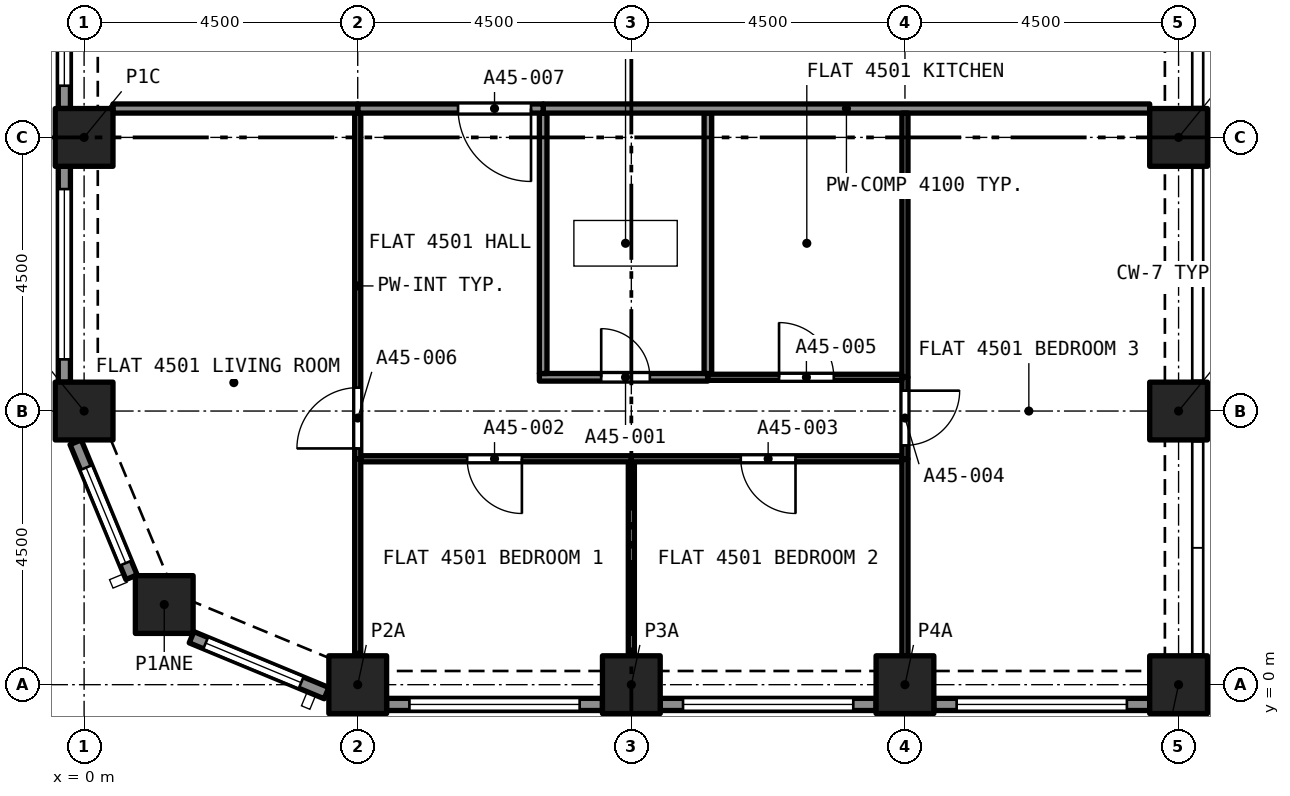
"""IFC4 building model, lengths in metres.
Left out: names, types, materials, properties, quantities, classifications, styles, units other than length and angle.
Written with IfcOpenShell. Run it as: python <this file> out.ifc"""

import sys

from ifc_helpers import new_model, si_unit, direction, frame, frame_2d, origin, origin_2d, place, context, subcontext, project, spatial, rectangle, extrude, element, fill, save


model = new_model("IFC4")
c1 = context("Model", 3, precision=1e-05, world=origin(), true_north=direction((0.0, 1.0)))
c2 = subcontext(c1, "Body", "Model", "MODEL_VIEW")
j1 = project(units=[si_unit("LENGTHUNIT", "METRE"), si_unit("PLANEANGLEUNIT", "RADIAN")], contexts=[c1])
p1 = place(None, origin())
s1 = spatial("IfcSite", under=j1, at=p1, CompositionType="ELEMENT")
p2 = place(p1, origin())
s2 = spatial("IfcBuilding", under=s1, at=p2, CompositionType="ELEMENT")
p3 = place(p2, frame((0.0, 0.0, 163.8)))
s3 = spatial("IfcBuildingStorey", under=s2, at=p3, CompositionType="ELEMENT", Elevation=163.8)
for number, where, z_axis, x_axis in (
    (1, (4.5, 0.0, 0.0), (0.0, 0.0, 1.0), (1.0, 0.0, 0.0)),
    (2, (9.0, 0.0, 0.0), (0.0, 0.0, 1.0), (1.0, 0.0, 0.0)),
    (3, (13.5, 0.0, 0.0), (0.0, 0.0, 1.0), (1.0, 0.0, 0.0)),
    (4, (18.0, 0.0, 0.0), (0.0, 0.0, 1.0), (1.0, 0.0, 0.0)),
    (5, (1.318, 1.318, 0.0), (0.0, 0.0, 1.0), (1.0, 0.0, 0.0)),
    (6, (0.0, 4.5, 0.0), (0.0, 0.0, 1.0), (1.0, 0.0, 0.0)),
    (7, (18.0, 4.5, 0.0), (0.0, 0.0, 1.0), (1.0, 0.0, 0.0)),
    (8, (0.0, 9.0, 0.0), (0.0, 0.0, 1.0), (1.0, 0.0, 0.0)),
    (9, (18.0, 9.0, 0.0), (0.0, 0.0, 1.0), (1.0, 0.0, 0.0)),
):
    element("IfcColumn", number, at=place(p3, frame(where, z_axis=z_axis, x_axis=x_axis)), inside=s3, PredefinedType="COLUMN", context=c2, shape_type="SweptSolid", body=[
        extrude(rectangle(XDim=0.95, YDim=0.95, at=origin_2d()), origin(), (0.0, 0.0, 1.0), 4.4),
    ])
p4 = place(p3, frame((-0.325, 9.475, 0.0), z_axis=(0.0, 0.0, 1.0), x_axis=(0.0, 1.0, 0.0)))
e10 = element("IfcWall", 10, at=p4, inside=s3, PredefinedType="SOLIDWALL", context=c2, shape_type="SweptSolid", body=[
    extrude(rectangle(XDim=3.55, YDim=0.2, at=frame_2d((1.775, 0.0))), origin(), (0.0, 0.0, 1.0), 4.4),
])
p5 = place(p4, frame((0.375, 0.0, 0.45)))
e11 = element("IfcOpeningElement", 11, at=p5, cuts=e10, PredefinedType="OPENING", context=c2, shape_type="SweptSolid", body=[
    extrude(rectangle(XDim=2.8, YDim=2.55, at=frame_2d((1.4, 1.275))), frame((0.0, 0.11, 0.0), z_axis=(0.0, -1.0, 0.0), x_axis=(1.0, 0.0, 0.0)), (0.0, 0.0, 1.0), 0.22),
])
p6 = place(p3, frame((-0.325, 4.975, 0.0), z_axis=(0.0, 0.0, 1.0), x_axis=(0.0, 1.0, 0.0)))
e12 = element("IfcWall", 12, at=p6, inside=s3, PredefinedType="SOLIDWALL", context=c2, shape_type="SweptSolid", body=[
    extrude(rectangle(XDim=3.55, YDim=0.2, at=frame_2d((1.775, 0.0))), origin(), (0.0, 0.0, 1.0), 4.4),
])
p7 = place(p6, frame((0.375, 0.0, 0.45)))
e13 = element("IfcOpeningElement", 13, at=p7, cuts=e12, PredefinedType="OPENING", context=c2, shape_type="SweptSolid", body=[
    extrude(rectangle(XDim=2.8, YDim=2.55, at=frame_2d((1.4, 1.275))), frame((0.0, 0.11, 0.0), z_axis=(0.0, -1.0, 0.0), x_axis=(1.0, 0.0, 0.0)), (0.0, 0.0, 1.0), 0.22),
])
p8 = place(p3, frame((0.78, 1.767, 0.0), z_axis=(0.0, 0.0, 1.0), x_axis=(-0.382680855588, 0.923880599843, 0.0)))
e14 = element("IfcWall", 14, at=p8, inside=s3, PredefinedType="SOLIDWALL", context=c2, shape_type="SweptSolid", body=[
    extrude(rectangle(XDim=2.403, YDim=0.2, at=frame_2d((1.201, 0.0))), origin(), (0.0, 0.0, 1.0), 4.4),
])
p9 = place(p8, frame((0.251, 0.0, 0.45)))
e15 = element("IfcOpeningElement", 15, at=p9, cuts=e14, PredefinedType="OPENING", context=c2, shape_type="SweptSolid", body=[
    extrude(rectangle(XDim=1.7, YDim=2.55, at=frame_2d((0.85, 1.275))), frame((0.0, 0.11, 0.0), z_axis=(0.0, -1.0, 0.0), x_axis=(1.0, 0.0, 0.0)), (0.0, 0.0, 1.0), 0.22),
])
p10 = place(p3, frame((3.987, -0.139, 0.0), z_axis=(0.0, 0.0, 1.0), x_axis=(-0.923880599843, 0.382680855588, 0.0)))
e16 = element("IfcWall", 16, at=p10, inside=s3, PredefinedType="SOLIDWALL", context=c2, shape_type="SweptSolid", body=[
    extrude(rectangle(XDim=2.403, YDim=0.2, at=frame_2d((1.201, 0.0))), origin(), (0.0, 0.0, 1.0), 4.4),
])
p11 = place(p10, frame((0.451, 0.0, 0.45)))
e17 = element("IfcOpeningElement", 17, at=p11, cuts=e16, PredefinedType="OPENING", context=c2, shape_type="SweptSolid", body=[
    extrude(rectangle(XDim=1.7, YDim=2.55, at=frame_2d((0.85, 1.275))), frame((0.0, 0.11, 0.0), z_axis=(0.0, -1.0, 0.0), x_axis=(1.0, 0.0, 0.0)), (0.0, 0.0, 1.0), 0.22),
])
p12 = place(p3, frame((8.525, -0.325, 0.0), z_axis=(0.0, 0.0, 1.0), x_axis=(-1.0, 0.0, 0.0)))
e18 = element("IfcWall", 18, at=p12, inside=s3, PredefinedType="SOLIDWALL", context=c2, shape_type="SweptSolid", body=[
    extrude(rectangle(XDim=3.55, YDim=0.2, at=frame_2d((1.775, 0.0))), origin(), (0.0, 0.0, 1.0), 4.4),
])
p13 = place(p12, frame((0.375, 0.0, 0.45)))
e19 = element("IfcOpeningElement", 19, at=p13, cuts=e18, PredefinedType="OPENING", context=c2, shape_type="SweptSolid", body=[
    extrude(rectangle(XDim=2.8, YDim=2.55, at=frame_2d((1.4, 1.275))), frame((0.0, 0.11, 0.0), z_axis=(0.0, -1.0, 0.0), x_axis=(1.0, 0.0, 0.0)), (0.0, 0.0, 1.0), 0.22),
])
p14 = place(p3, frame((13.025, -0.325, 0.0), z_axis=(0.0, 0.0, 1.0), x_axis=(-1.0, 0.0, 0.0)))
e20 = element("IfcWall", 20, at=p14, inside=s3, PredefinedType="SOLIDWALL", context=c2, shape_type="SweptSolid", body=[
    extrude(rectangle(XDim=3.55, YDim=0.2, at=frame_2d((1.775, 0.0))), origin(), (0.0, 0.0, 1.0), 4.4),
])
p15 = place(p14, frame((0.375, 0.0, 0.45)))
e21 = element("IfcOpeningElement", 21, at=p15, cuts=e20, PredefinedType="OPENING", context=c2, shape_type="SweptSolid", body=[
    extrude(rectangle(XDim=2.8, YDim=2.55, at=frame_2d((1.4, 1.275))), frame((0.0, 0.11, 0.0), z_axis=(0.0, -1.0, 0.0), x_axis=(1.0, 0.0, 0.0)), (0.0, 0.0, 1.0), 0.22),
])
p16 = place(p3, frame((17.525, -0.325, 0.0), z_axis=(0.0, 0.0, 1.0), x_axis=(-1.0, 0.0, 0.0)))
e22 = element("IfcWall", 22, at=p16, inside=s3, PredefinedType="SOLIDWALL", context=c2, shape_type="SweptSolid", body=[
    extrude(rectangle(XDim=3.55, YDim=0.2, at=frame_2d((1.775, 0.0))), origin(), (0.0, 0.0, 1.0), 4.4),
])
p17 = place(p16, frame((0.375, 0.0, 0.45)))
e23 = element("IfcOpeningElement", 23, at=p17, cuts=e22, PredefinedType="OPENING", context=c2, shape_type="SweptSolid", body=[
    extrude(rectangle(XDim=2.8, YDim=2.55, at=frame_2d((1.4, 1.275))), frame((0.0, 0.11, 0.0), z_axis=(0.0, -1.0, 0.0), x_axis=(1.0, 0.0, 0.0)), (0.0, 0.0, 1.0), 0.22),
])
p18 = place(p3, frame((7.488, 5.055, 0.0), z_axis=(0.0, 0.0, 1.0), x_axis=(1.0, 0.0, 0.0)))
e24 = element("IfcWall", 24, at=p18, inside=s3, PredefinedType="PARTITIONING", context=c2, shape_type="SweptSolid", body=[
    extrude(rectangle(XDim=2.771, YDim=0.125, at=frame_2d((1.385, 0.0))), origin(), (0.0, 0.0, 1.0), 4.1),
])
p19 = place(p18, frame((1.017, 0.0, 0.0)))
e25 = element("IfcOpeningElement", 25, at=p19, cuts=e24, PredefinedType="OPENING", context=c2, shape_type="SweptSolid", body=[
    extrude(rectangle(XDim=0.8, YDim=2.1, at=frame_2d((0.4, 1.05))), frame((0.0, 0.073, 0.0), z_axis=(0.0, -1.0, 0.0), x_axis=(1.0, 0.0, 0.0)), (0.0, 0.0, 1.0), 0.145),
])
for number, where, z_axis, x_axis in (
    (26, (7.55, 5.117, 0.0), (0.0, 0.0, 1.0), (0.0, 1.0, 0.0)),
    (27, (10.259, 5.117, 0.0), (0.0, 0.0, 1.0), (0.0, 1.0, 0.0)),
):
    element("IfcWall", number, at=place(p3, frame(where, z_axis=z_axis, x_axis=x_axis)), inside=s3, PredefinedType="PARTITIONING", context=c2, shape_type="SweptSolid", body=[
        extrude(rectangle(XDim=4.282, YDim=0.125, at=frame_2d((2.141, 0.0))), origin(), (0.0, 0.0, 1.0), 4.1),
    ])
p20 = place(p3, frame((7.55, 9.475, 0.0), z_axis=(0.0, 0.0, 1.0), x_axis=(1.0, 0.0, 0.0)))
e28 = element("IfcWall", 28, at=p20, inside=s3, PredefinedType="PARTITIONING", context=c2, shape_type="SweptSolid", body=[
    extrude(rectangle(XDim=9.975, YDim=0.15, at=frame_2d((4.987, 0.0))), origin(), (0.0, 0.0, 1.0), 4.1),
])
p21 = place(p3, frame((9.0, 0.475, 0.0), z_axis=(0.0, 0.0, 1.0), x_axis=(0.0, 1.0, 0.0)))
e29 = element("IfcWall", 29, at=p21, inside=s3, PredefinedType="PARTITIONING", context=c2, shape_type="SweptSolid", body=[
    extrude(rectangle(XDim=3.19, YDim=0.1, at=frame_2d((1.595, 0.0))), origin(), (0.0, 0.0, 1.0), 4.1),
])
p22 = place(p3, frame((9.0, 3.715, 0.0), z_axis=(0.0, 0.0, 1.0), x_axis=(-1.0, 0.0, 0.0)))
e30 = element("IfcWall", 30, at=p22, inside=s3, PredefinedType="PARTITIONING", context=c2, shape_type="SweptSolid", body=[
    extrude(rectangle(XDim=4.45, YDim=0.1, at=frame_2d((2.225, 0.0))), origin(), (0.0, 0.0, 1.0), 4.1),
])
p23 = place(p22, frame((1.8, 0.0, 0.0)))
e31 = element("IfcOpeningElement", 31, at=p23, cuts=e30, PredefinedType="OPENING", context=c2, shape_type="SweptSolid", body=[
    extrude(rectangle(XDim=0.9, YDim=2.1, at=frame_2d((0.45, 1.05))), frame((0.0, 0.06, 0.0), z_axis=(0.0, -1.0, 0.0), x_axis=(1.0, 0.0, 0.0)), (0.0, 0.0, 1.0), 0.12),
])
p24 = place(p3, frame((4.5, 0.514, 0.0), z_axis=(0.0, 0.0, 1.0), x_axis=(0.0, 1.0, 0.0)))
e32 = element("IfcWall", 32, at=p24, inside=s3, PredefinedType="PARTITIONING", context=c2, shape_type="SweptSolid", body=[
    extrude(rectangle(XDim=3.201, YDim=0.1, at=frame_2d((1.601, 0.0))), origin(), (0.0, 0.0, 1.0), 4.1),
])
p25 = place(p3, frame((13.5, 0.475, 0.0), z_axis=(0.0, 0.0, 1.0), x_axis=(0.0, 1.0, 0.0)))
e33 = element("IfcWall", 33, at=p25, inside=s3, PredefinedType="PARTITIONING", context=c2, shape_type="SweptSolid", body=[
    extrude(rectangle(XDim=3.24, YDim=0.1, at=frame_2d((1.62, 0.0))), origin(), (0.0, 0.0, 1.0), 4.1),
])
p26 = place(p3, frame((13.45, 3.715, 0.0), z_axis=(0.0, 0.0, 1.0), x_axis=(-1.0, 0.0, 0.0)))
e34 = element("IfcWall", 34, at=p26, inside=s3, PredefinedType="PARTITIONING", context=c2, shape_type="SweptSolid", body=[
    extrude(rectangle(XDim=4.45, YDim=0.1, at=frame_2d((2.225, 0.0))), origin(), (0.0, 0.0, 1.0), 4.1),
])
p27 = place(p26, frame((1.75, 0.0, 0.0)))
e35 = element("IfcOpeningElement", 35, at=p27, cuts=e34, PredefinedType="OPENING", context=c2, shape_type="SweptSolid", body=[
    extrude(rectangle(XDim=0.9, YDim=2.1, at=frame_2d((0.45, 1.05))), frame((0.0, 0.06, 0.0), z_axis=(0.0, -1.0, 0.0), x_axis=(1.0, 0.0, 0.0)), (0.0, 0.0, 1.0), 0.12),
])
p28 = place(p3, frame((13.5, 5.055, 0.0), z_axis=(0.0, 0.0, 1.0), x_axis=(0.0, -1.0, 0.0)))
e36 = element("IfcWall", 36, at=p28, inside=s3, PredefinedType="PARTITIONING", context=c2, shape_type="SweptSolid", body=[
    extrude(rectangle(XDim=1.34, YDim=0.1, at=frame_2d((0.67, 0.0))), origin(), (0.0, 0.0, 1.0), 4.1),
])
p29 = place(p28, frame((0.22, 0.0, 0.0)))
e37 = element("IfcOpeningElement", 37, at=p29, cuts=e36, PredefinedType="OPENING", context=c2, shape_type="SweptSolid", body=[
    extrude(rectangle(XDim=0.9, YDim=2.1, at=frame_2d((0.45, 1.05))), frame((0.0, 0.06, 0.0), z_axis=(0.0, -1.0, 0.0), x_axis=(1.0, 0.0, 0.0)), (0.0, 0.0, 1.0), 0.12),
])
p30 = place(p3, frame((13.5, 5.055, 0.0), z_axis=(0.0, 0.0, 1.0), x_axis=(0.0, 1.0, 0.0)))
e38 = element("IfcWall", 38, at=p30, inside=s3, PredefinedType="PARTITIONING", context=c2, shape_type="SweptSolid", body=[
    extrude(rectangle(XDim=4.345, YDim=0.1, at=frame_2d((2.172, 0.0))), origin(), (0.0, 0.0, 1.0), 4.1),
])
p31 = place(p3, frame((10.259, 5.055, 0.0), z_axis=(0.0, 0.0, 1.0), x_axis=(1.0, 0.0, 0.0)))
e39 = element("IfcWall", 39, at=p31, inside=s3, PredefinedType="PARTITIONING", context=c2, shape_type="SweptSolid", body=[
    extrude(rectangle(XDim=3.191, YDim=0.1, at=frame_2d((1.596, 0.0))), origin(), (0.0, 0.0, 1.0), 4.1),
])
p32 = place(p31, frame((1.171, 0.0, 0.0)))
e40 = element("IfcOpeningElement", 40, at=p32, cuts=e39, PredefinedType="OPENING", context=c2, shape_type="SweptSolid", body=[
    extrude(rectangle(XDim=0.9, YDim=2.1, at=frame_2d((0.45, 1.05))), frame((0.0, 0.06, 0.0), z_axis=(0.0, -1.0, 0.0), x_axis=(1.0, 0.0, 0.0)), (0.0, 0.0, 1.0), 0.12),
])
p33 = place(p3, frame((4.5, 3.715, 0.0), z_axis=(0.0, 0.0, 1.0), x_axis=(0.0, 1.0, 0.0)))
e41 = element("IfcWall", 41, at=p33, inside=s3, PredefinedType="PARTITIONING", context=c2, shape_type="SweptSolid", body=[
    extrude(rectangle(XDim=5.685, YDim=0.1, at=frame_2d((2.842, 0.0))), origin(), (0.0, 0.0, 1.0), 4.1),
])
p34 = place(p33, frame((0.17, 0.0, 0.0)))
e42 = element("IfcOpeningElement", 42, at=p34, cuts=e41, PredefinedType="OPENING", context=c2, shape_type="SweptSolid", body=[
    extrude(rectangle(XDim=1.0, YDim=2.1, at=frame_2d((0.5, 1.05))), frame((0.0, 0.06, 0.0), z_axis=(0.0, -1.0, 0.0), x_axis=(1.0, 0.0, 0.0)), (0.0, 0.0, 1.0), 0.12),
])
p35 = place(p3, frame((7.55, 9.475, 0.0), z_axis=(0.0, 0.0, 1.0), x_axis=(-1.0, 0.0, 0.0)))
e43 = element("IfcWall", 43, at=p35, inside=s3, PredefinedType="PARTITIONING", context=c2, shape_type="SweptSolid", body=[
    extrude(rectangle(XDim=3.05, YDim=0.15, at=frame_2d((1.525, 0.0))), origin(), (0.0, 0.0, 1.0), 4.1),
])
p36 = place(p35, frame((0.2, 0.0, 0.0)))
e44 = element("IfcOpeningElement", 44, at=p36, cuts=e43, PredefinedType="OPENING", context=c2, shape_type="SweptSolid", body=[
    extrude(rectangle(XDim=1.2, YDim=2.4, at=frame_2d((0.6, 1.2))), frame((0.0, 0.085, 0.0), z_axis=(0.0, -1.0, 0.0), x_axis=(1.0, 0.0, 0.0)), (0.0, 0.0, 1.0), 0.17),
])
p37 = place(p3, frame((0.475, 9.475, 0.0), z_axis=(0.0, 0.0, 1.0), x_axis=(1.0, 0.0, 0.0)))
e45 = element("IfcWall", 45, at=p37, inside=s3, PredefinedType="PARTITIONING", context=c2, shape_type="SweptSolid", body=[
    extrude(rectangle(XDim=4.025, YDim=0.15, at=frame_2d((2.012, 0.0))), origin(), (0.0, 0.0, 1.0), 4.1),
])
p38 = place(p5, origin())
e46 = element("IfcWindow", 46, at=p38, inside=s3, PartitioningType="SINGLE_PANEL", PredefinedType="WINDOW", context=c2, shape_type="SweptSolid", body=[
    extrude(rectangle(XDim=2.8, YDim=2.55, at=frame_2d((1.4, 1.275))), frame((0.0, 0.03, 0.0), z_axis=(0.0, -1.0, 0.0), x_axis=(1.0, 0.0, 0.0)), (0.0, 0.0, 1.0), 0.06),
])
fill(e11, e46)
p39 = place(p7, origin())
e47 = element("IfcWindow", 47, at=p39, inside=s3, PartitioningType="SINGLE_PANEL", PredefinedType="WINDOW", context=c2, shape_type="SweptSolid", body=[
    extrude(rectangle(XDim=2.8, YDim=2.55, at=frame_2d((1.4, 1.275))), frame((0.0, 0.03, 0.0), z_axis=(0.0, -1.0, 0.0), x_axis=(1.0, 0.0, 0.0)), (0.0, 0.0, 1.0), 0.06),
])
fill(e13, e47)
p40 = place(p9, origin())
e48 = element("IfcWindow", 48, at=p40, inside=s3, PartitioningType="SINGLE_PANEL", PredefinedType="WINDOW", context=c2, shape_type="SweptSolid", body=[
    extrude(rectangle(XDim=1.7, YDim=2.55, at=frame_2d((0.85, 1.275))), frame((0.0, 0.03, 0.0), z_axis=(0.0, -1.0, 0.0), x_axis=(1.0, 0.0, 0.0)), (0.0, 0.0, 1.0), 0.06),
])
fill(e15, e48)
p41 = place(p11, origin())
e49 = element("IfcWindow", 49, at=p41, inside=s3, PartitioningType="SINGLE_PANEL", PredefinedType="WINDOW", context=c2, shape_type="SweptSolid", body=[
    extrude(rectangle(XDim=1.7, YDim=2.55, at=frame_2d((0.85, 1.275))), frame((0.0, 0.03, 0.0), z_axis=(0.0, -1.0, 0.0), x_axis=(1.0, 0.0, 0.0)), (0.0, 0.0, 1.0), 0.06),
])
fill(e17, e49)
p42 = place(p13, origin())
e50 = element("IfcWindow", 50, at=p42, inside=s3, PartitioningType="SINGLE_PANEL", PredefinedType="WINDOW", context=c2, shape_type="SweptSolid", body=[
    extrude(rectangle(XDim=2.8, YDim=2.55, at=frame_2d((1.4, 1.275))), frame((0.0, 0.03, 0.0), z_axis=(0.0, -1.0, 0.0), x_axis=(1.0, 0.0, 0.0)), (0.0, 0.0, 1.0), 0.06),
])
fill(e19, e50)
p43 = place(p15, origin())
e51 = element("IfcWindow", 51, at=p43, inside=s3, PartitioningType="SINGLE_PANEL", PredefinedType="WINDOW", context=c2, shape_type="SweptSolid", body=[
    extrude(rectangle(XDim=2.8, YDim=2.55, at=frame_2d((1.4, 1.275))), frame((0.0, 0.03, 0.0), z_axis=(0.0, -1.0, 0.0), x_axis=(1.0, 0.0, 0.0)), (0.0, 0.0, 1.0), 0.06),
])
fill(e21, e51)
p44 = place(p17, origin())
e52 = element("IfcWindow", 52, at=p44, inside=s3, PartitioningType="SINGLE_PANEL", PredefinedType="WINDOW", context=c2, shape_type="SweptSolid", body=[
    extrude(rectangle(XDim=2.8, YDim=2.55, at=frame_2d((1.4, 1.275))), frame((0.0, 0.03, 0.0), z_axis=(0.0, -1.0, 0.0), x_axis=(1.0, 0.0, 0.0)), (0.0, 0.0, 1.0), 0.06),
])
fill(e23, e52)
p45 = place(p19, origin())
e53 = element("IfcDoor", 53, at=p45, inside=s3, OperationType="SINGLE_SWING_RIGHT", PredefinedType="DOOR", context=c2, shape_type="SweptSolid", body=[
    extrude(rectangle(XDim=0.8, YDim=2.1, at=frame_2d((0.4, 1.05))), frame((0.0, 0.025, 0.0), z_axis=(0.0, -1.0, 0.0), x_axis=(1.0, 0.0, 0.0)), (0.0, 0.0, 1.0), 0.05),
])
fill(e25, e53)
p46 = place(p23, origin())
e54 = element("IfcDoor", 54, at=p46, inside=s3, OperationType="SINGLE_SWING_RIGHT", PredefinedType="DOOR", context=c2, shape_type="SweptSolid", body=[
    extrude(rectangle(XDim=0.9, YDim=2.1, at=frame_2d((0.45, 1.05))), frame((0.0, 0.025, 0.0), z_axis=(0.0, -1.0, 0.0), x_axis=(1.0, 0.0, 0.0)), (0.0, 0.0, 1.0), 0.05),
])
fill(e31, e54)
p47 = place(p27, origin())
e55 = element("IfcDoor", 55, at=p47, inside=s3, OperationType="SINGLE_SWING_LEFT", PredefinedType="DOOR", context=c2, shape_type="SweptSolid", body=[
    extrude(rectangle(XDim=0.9, YDim=2.1, at=frame_2d((0.45, 1.05))), frame((0.0, 0.025, 0.0), z_axis=(0.0, -1.0, 0.0), x_axis=(1.0, 0.0, 0.0)), (0.0, 0.0, 1.0), 0.05),
])
fill(e35, e55)
p48 = place(p29, origin())
e56 = element("IfcDoor", 56, at=p48, inside=s3, OperationType="SINGLE_SWING_RIGHT", PredefinedType="DOOR", context=c2, shape_type="SweptSolid", body=[
    extrude(rectangle(XDim=0.9, YDim=2.1, at=frame_2d((0.45, 1.05))), frame((0.0, 0.025, 0.0), z_axis=(0.0, -1.0, 0.0), x_axis=(1.0, 0.0, 0.0)), (0.0, 0.0, 1.0), 0.05),
])
fill(e37, e56)
p49 = place(p32, origin())
e57 = element("IfcDoor", 57, at=p49, inside=s3, OperationType="SINGLE_SWING_RIGHT", PredefinedType="DOOR", context=c2, shape_type="SweptSolid", body=[
    extrude(rectangle(XDim=0.9, YDim=2.1, at=frame_2d((0.45, 1.05))), frame((0.0, 0.025, 0.0), z_axis=(0.0, -1.0, 0.0), x_axis=(1.0, 0.0, 0.0)), (0.0, 0.0, 1.0), 0.05),
])
fill(e40, e57)
p50 = place(p34, origin())
e58 = element("IfcDoor", 58, at=p50, inside=s3, OperationType="SINGLE_SWING_LEFT", PredefinedType="DOOR", context=c2, shape_type="SweptSolid", body=[
    extrude(rectangle(XDim=1.0, YDim=2.1, at=frame_2d((0.5, 1.05))), frame((0.0, 0.025, 0.0), z_axis=(0.0, -1.0, 0.0), x_axis=(1.0, 0.0, 0.0)), (0.0, 0.0, 1.0), 0.05),
])
fill(e42, e58)
p51 = place(p36, origin())
e59 = element("IfcDoor", 59, at=p51, inside=s3, OperationType="SINGLE_SWING_LEFT", PredefinedType="DOOR", context=c2, shape_type="SweptSolid", body=[
    extrude(rectangle(XDim=1.2, YDim=2.4, at=frame_2d((0.6, 1.2))), frame((0.0, 0.025, 0.0), z_axis=(0.0, -1.0, 0.0), x_axis=(1.0, 0.0, 0.0)), (0.0, 0.0, 1.0), 0.05),
])
fill(e44, e59)
save(model, sys.argv[1])
